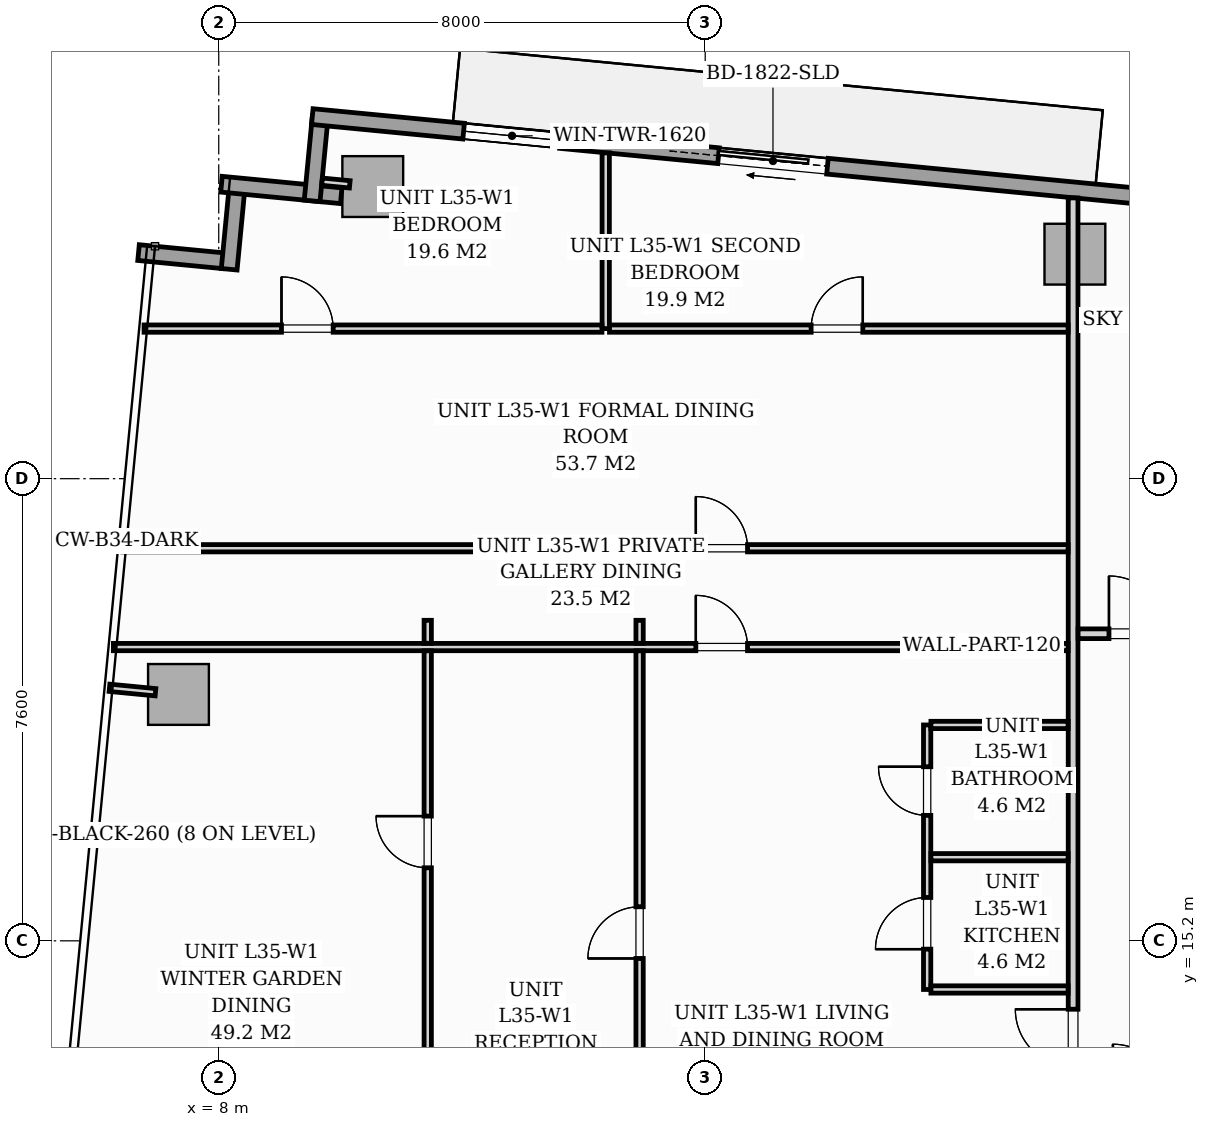
"""IFC4 building model, lengths in metres.
Left out: names, types, materials, properties, quantities, classifications, styles, units other than length and angle.
Written with IfcOpenShell. Run it as: python <this file> out.ifc"""

import sys

from ifc_helpers import new_model, si_unit, direction, frame, frame_2d, origin, origin_2d, place, context, subcontext, project, spatial, rectangle, extrude, source, transform, mapped, element, fill, save


model = new_model("IFC4")
c1 = context("Model", 3, precision=1e-05, world=origin(), true_north=direction((0.0, 1.0)))
c2 = subcontext(c1, "Body", "Model", "MODEL_VIEW")
j1 = project(units=[si_unit("LENGTHUNIT", "METRE"), si_unit("PLANEANGLEUNIT", "RADIAN")], contexts=[c1])
p1 = place(None, origin())
s1 = spatial("IfcSite", under=j1, at=p1, CompositionType="ELEMENT")
p2 = place(p1, origin())
s2 = spatial("IfcBuilding", under=s1, at=p2, CompositionType="ELEMENT")
p3 = place(p2, frame((0.0, 0.0, 124.6)))
s3 = spatial("IfcBuildingStorey", under=s2, at=p3, CompositionType="ELEMENT", Elevation=124.6)
m1 = source(origin(), c2, "Body", "SweptSolid", [
    extrude(rectangle(XDim=1.0, YDim=1.0, at=origin_2d()), origin(), (0.0, 0.0, 1.0), 3.194),
])
for number, where, z_axis, x_axis in (
    (1, (10.533, 27.604, 0.004), (0.0, 0.0, 1.0), (0.995, -0.096, 0.0)),
    (2, (22.08, 26.492, 0.004), (0.0, 0.0, 1.0), (0.995, -0.096, 0.0)),
    (3, (7.338, 19.252, 0.004), (0.0, 0.0, 1.0), (0.995, -0.096, 0.0)),
):
    element("IfcColumn", number, at=place(p3, frame(where, z_axis=z_axis, x_axis=x_axis)), inside=s3, PredefinedType="COLUMN", context=c2, shape_type="MappedRepresentation", body=[
        mapped(m1, transform((0.0, 0.0, 0.0), scale=1.0)),
    ])
p4 = place(p3, frame((6.681, 26.518, 0.0), z_axis=(0.0, 0.0, 1.0), x_axis=(0.995389446633, -0.095915846097, 0.0)))
e4 = element("IfcWall", 4, at=p4, inside=s3, PredefinedType="STANDARD", context=c2, shape_type="SweptSolid", body=[
    extrude(rectangle(XDim=1.395, YDim=0.26, at=frame_2d((0.697, 0.0))), origin(), (0.0, 0.0, 1.0), 2.94),
])
p5 = place(p3, frame((8.172, 26.244, 0.0), z_axis=(0.0, 0.0, 1.0), x_axis=(0.095725744959, 0.99540774648, 0.0)))
e5 = element("IfcWall", 5, at=p5, inside=s3, PredefinedType="STANDARD", context=c2, shape_type="SweptSolid", body=[
    extrude(rectangle(XDim=1.395, YDim=0.26, at=frame_2d((0.698, 0.0))), origin(), (0.0, 0.0, 1.0), 2.94),
])
p6 = place(p3, frame((8.045, 27.643, 0.0), z_axis=(0.0, 0.0, 1.0), x_axis=(0.995391147587, -0.095898192396, 0.0)))
e6 = element("IfcWall", 6, at=p6, inside=s3, PredefinedType="STANDARD", context=c2, shape_type="SweptSolid", body=[
    extrude(rectangle(XDim=1.978, YDim=0.26, at=frame_2d((0.989, 0.0))), origin(), (0.0, 0.0, 1.0), 2.94),
])
p7 = place(p3, frame((9.536, 27.368, 0.0), z_axis=(0.0, 0.0, 1.0), x_axis=(0.095915846097, 0.995389446633, 0.0)))
e7 = element("IfcWall", 7, at=p7, inside=s3, PredefinedType="STANDARD", context=c2, shape_type="SweptSolid", body=[
    extrude(rectangle(XDim=1.395, YDim=0.26, at=frame_2d((0.697, 0.0))), origin(), (0.0, 0.0, 1.0), 2.94),
])
p8 = place(p3, frame((9.539, 28.754, 0.0), z_axis=(0.0, 0.0, 1.0), x_axis=(0.995397345886, -0.09583383433, 0.0)))
e8 = element("IfcWall", 8, at=p8, inside=s3, PredefinedType="STANDARD", context=c2, shape_type="SweptSolid", body=[
    extrude(rectangle(XDim=17.01, YDim=0.26, at=frame_2d((8.505, 0.0))), origin(), (0.0, 0.0, 1.0), 2.94),
])
p9 = place(p8, frame((6.711, 0.0, 0.0)))
e9 = element("IfcOpeningElement", 9, at=p9, cuts=e8, PredefinedType="OPENING", context=c2, shape_type="SweptSolid", body=[
    extrude(rectangle(XDim=1.8, YDim=2.06, at=frame_2d((0.9, 1.03))), frame((0.0, 0.14, 0.0), z_axis=(0.0, -1.0, 0.0), x_axis=(1.0, 0.0, 0.0)), (0.0, 0.0, 1.0), 0.28),
])
p10 = place(p8, frame((2.5, 0.0, 0.65)))
e10 = element("IfcOpeningElement", 10, at=p10, cuts=e8, PredefinedType="OPENING", context=c2, shape_type="SweptSolid", body=[
    extrude(rectangle(XDim=1.6, YDim=1.5, at=frame_2d((0.8, 0.75))), frame((0.0, 0.14, 0.0), z_axis=(0.0, -1.0, 0.0), x_axis=(1.0, 0.0, 0.0)), (0.0, 0.0, 1.0), 0.28),
])
p11 = place(p3, frame((22.05, 12.632, 0.0), z_axis=(0.0, 0.0, 1.0), x_axis=(0.0, 1.0, 0.0)))
e11 = element("IfcWall", 11, at=p11, inside=s3, PredefinedType="PARTITIONING", context=c2, shape_type="SweptSolid", body=[
    extrude(rectangle(XDim=14.785, YDim=0.16, at=frame_2d((7.393, 0.0))), origin(), (0.0, 0.0, 1.0), 2.94),
])
p12 = place(p11, frame((0.493, 0.0, 0.0)))
e12 = element("IfcOpeningElement", 12, at=p12, cuts=e11, PredefinedType="OPENING", context=c2, shape_type="SweptSolid", body=[
    extrude(rectangle(XDim=0.95, YDim=2.06, at=frame_2d((0.475, 1.03))), frame((0.0, 0.09, 0.0), z_axis=(0.0, -1.0, 0.0), x_axis=(1.0, 0.0, 0.0)), (0.0, 0.0, 1.0), 0.18),
])
p13 = place(p3, frame((19.65, 14.4, 0.0), z_axis=(0.0, 0.0, 1.0), x_axis=(0.0, 1.0, 0.0)))
e13 = element("IfcWall", 13, at=p13, inside=s3, PredefinedType="PARTITIONING", context=c2, shape_type="SweptSolid", body=[
    extrude(rectangle(XDim=4.35, YDim=0.12, at=frame_2d((2.175, 0.0))), origin(), (0.0, 0.0, 1.0), 2.94),
])
p14 = place(p13, frame((0.663, 0.0, 0.0)))
e14 = element("IfcOpeningElement", 14, at=p14, cuts=e13, PredefinedType="OPENING", context=c2, shape_type="SweptSolid", body=[
    extrude(rectangle(XDim=0.85, YDim=2.05, at=frame_2d((0.425, 1.025))), frame((0.0, 0.07, 0.0), z_axis=(0.0, -1.0, 0.0), x_axis=(1.0, 0.0, 0.0)), (0.0, 0.0, 1.0), 0.14),
])
p15 = place(p13, frame((2.863, 0.0, 0.0)))
e15 = element("IfcOpeningElement", 15, at=p15, cuts=e13, PredefinedType="OPENING", context=c2, shape_type="SweptSolid", body=[
    extrude(rectangle(XDim=0.8, YDim=2.02, at=frame_2d((0.4, 1.01))), frame((0.0, 0.07, 0.0), z_axis=(0.0, -1.0, 0.0), x_axis=(1.0, 0.0, 0.0)), (0.0, 0.0, 1.0), 0.14),
])
for number, where, z_axis, x_axis in (
    (16, (19.712, 16.575, 0.0), (0.0, 0.0, 1.0), (1.0, 0.0, 0.0)),
    (17, (19.712, 14.4, 0.0), (0.0, 0.0, 1.0), (1.0, 0.0, 0.0)),
    (18, (19.712, 18.75, 0.0), (0.0, 0.0, 1.0), (1.0, 0.0, 0.0)),
):
    element("IfcWall", number, at=place(p3, frame(where, z_axis=z_axis, x_axis=x_axis)), inside=s3, PredefinedType="PARTITIONING", context=c2, shape_type="SweptSolid", body=[
        extrude(rectangle(XDim=2.256, YDim=0.12, at=frame_2d((1.128, 0.0))), origin(), (0.0, 0.0, 1.0), 2.94),
    ])
p16 = place(p3, frame((14.364, 25.268, 0.0), z_axis=(0.0, 0.0, 1.0), x_axis=(0.0, 1.0, 0.0)))
e19 = element("IfcWall", 19, at=p16, inside=s3, PredefinedType="PARTITIONING", context=c2, shape_type="SweptSolid", body=[
    extrude(rectangle(XDim=2.889, YDim=0.12, at=frame_2d((1.445, 0.0))), origin(), (0.0, 0.0, 1.0), 2.94),
])
p17 = place(p3, frame((6.772, 25.268, 0.0), z_axis=(0.0, 0.0, 1.0), x_axis=(1.0, 0.0, 0.0)))
e20 = element("IfcWall", 20, at=p17, inside=s3, PredefinedType="PARTITIONING", context=c2, shape_type="SweptSolid", body=[
    extrude(rectangle(XDim=7.53, YDim=0.12, at=frame_2d((3.765, 0.0))), origin(), (0.0, 0.0, 1.0), 2.94),
])
p18 = place(p17, frame((2.26, 0.0, 0.0)))
e21 = element("IfcOpeningElement", 21, at=p18, cuts=e20, PredefinedType="OPENING", context=c2, shape_type="SweptSolid", body=[
    extrude(rectangle(XDim=0.85, YDim=2.05, at=frame_2d((0.425, 1.025))), frame((0.0, 0.07, 0.0), z_axis=(0.0, -1.0, 0.0), x_axis=(1.0, 0.0, 0.0)), (0.0, 0.0, 1.0), 0.14),
])
p19 = place(p3, frame((14.426, 25.268, 0.0), z_axis=(0.0, 0.0, 1.0), x_axis=(1.0, 0.0, 0.0)))
e22 = element("IfcWall", 22, at=p19, inside=s3, PredefinedType="PARTITIONING", context=c2, shape_type="SweptSolid", body=[
    extrude(rectangle(XDim=7.542, YDim=0.12, at=frame_2d((3.771, 0.0))), origin(), (0.0, 0.0, 1.0), 2.94),
])
p20 = place(p19, frame((3.316, 0.0, 0.0)))
e23 = element("IfcOpeningElement", 23, at=p20, cuts=e22, PredefinedType="OPENING", context=c2, shape_type="SweptSolid", body=[
    extrude(rectangle(XDim=0.85, YDim=2.05, at=frame_2d((0.425, 1.025))), frame((0.0, 0.07, 0.0), z_axis=(0.0, -1.0, 0.0), x_axis=(1.0, 0.0, 0.0)), (0.0, 0.0, 1.0), 0.14),
])
p21 = place(p3, frame((6.424, 21.656, 0.0), z_axis=(0.0, 0.0, 1.0), x_axis=(1.0, 0.0, 0.0)))
e24 = element("IfcWall", 24, at=p21, inside=s3, PredefinedType="PARTITIONING", context=c2, shape_type="SweptSolid", body=[
    extrude(rectangle(XDim=15.544, YDim=0.12, at=frame_2d((7.772, 0.0))), origin(), (0.0, 0.0, 1.0), 2.94),
])
p22 = place(p21, frame((9.422, 0.0, 0.0)))
e25 = element("IfcOpeningElement", 25, at=p22, cuts=e24, PredefinedType="OPENING", context=c2, shape_type="SweptSolid", body=[
    extrude(rectangle(XDim=0.85, YDim=2.05, at=frame_2d((0.425, 1.025))), frame((0.0, 0.07, 0.0), z_axis=(0.0, -1.0, 0.0), x_axis=(1.0, 0.0, 0.0)), (0.0, 0.0, 1.0), 0.14),
])
p23 = place(p3, frame((6.268, 20.031, 0.0), z_axis=(0.0, 0.0, 1.0), x_axis=(1.0, 0.0, 0.0)))
e26 = element("IfcWall", 26, at=p23, inside=s3, PredefinedType="PARTITIONING", context=c2, shape_type="SweptSolid", body=[
    extrude(rectangle(XDim=15.7, YDim=0.12, at=frame_2d((7.85, 0.0))), origin(), (0.0, 0.0, 1.0), 2.94),
])
p24 = place(p23, frame((9.579, 0.0, 0.0)))
e27 = element("IfcOpeningElement", 27, at=p24, cuts=e26, PredefinedType="OPENING", context=c2, shape_type="SweptSolid", body=[
    extrude(rectangle(XDim=0.85, YDim=2.05, at=frame_2d((0.425, 1.025))), frame((0.0, 0.07, 0.0), z_axis=(0.0, -1.0, 0.0), x_axis=(1.0, 0.0, 0.0)), (0.0, 0.0, 1.0), 0.14),
])
p25 = place(p3, frame((11.437, 10.701, 0.0), z_axis=(0.0, 0.0, 1.0), x_axis=(0.0, 1.0, 0.0)))
e28 = element("IfcWall", 28, at=p25, inside=s3, PredefinedType="PARTITIONING", context=c2, shape_type="SweptSolid", body=[
    extrude(rectangle(XDim=9.268, YDim=0.12, at=frame_2d((4.634, 0.0))), origin(), (0.0, 0.0, 1.0), 2.94),
])
p26 = place(p25, frame((5.7, 0.0, 0.0)))
e29 = element("IfcOpeningElement", 29, at=p26, cuts=e28, PredefinedType="OPENING", context=c2, shape_type="SweptSolid", body=[
    extrude(rectangle(XDim=0.85, YDim=2.05, at=frame_2d((0.425, 1.025))), frame((0.0, 0.07, 0.0), z_axis=(0.0, -1.0, 0.0), x_axis=(1.0, 0.0, 0.0)), (0.0, 0.0, 1.0), 0.14),
])
p27 = place(p3, frame((11.437, 20.093, 0.0), z_axis=(0.0, 0.0, 1.0), x_axis=(0.0, 1.0, 0.0)))
e30 = element("IfcWall", 30, at=p27, inside=s3, PredefinedType="PARTITIONING", context=c2, shape_type="SweptSolid", body=[
    extrude(rectangle(XDim=0.378, YDim=0.12, at=frame_2d((0.189, 0.0))), origin(), (0.0, 0.0, 1.0), 2.94),
])
p28 = place(p3, frame((14.921, 10.701, 0.0), z_axis=(0.0, 0.0, 1.0), x_axis=(0.0, 1.0, 0.0)))
e31 = element("IfcWall", 31, at=p28, inside=s3, PredefinedType="PARTITIONING", context=c2, shape_type="SweptSolid", body=[
    extrude(rectangle(XDim=9.268, YDim=0.12, at=frame_2d((4.634, 0.0))), origin(), (0.0, 0.0, 1.0), 2.94),
])
p29 = place(p28, frame((4.209, 0.0, 0.0)))
e32 = element("IfcOpeningElement", 32, at=p29, cuts=e31, PredefinedType="OPENING", context=c2, shape_type="SweptSolid", body=[
    extrude(rectangle(XDim=0.85, YDim=2.05, at=frame_2d((0.425, 1.025))), frame((0.0, 0.07, 0.0), z_axis=(0.0, -1.0, 0.0), x_axis=(1.0, 0.0, 0.0)), (0.0, 0.0, 1.0), 0.14),
])
p30 = place(p3, frame((14.921, 20.093, 0.0), z_axis=(0.0, 0.0, 1.0), x_axis=(0.0, 1.0, 0.0)))
e33 = element("IfcWall", 33, at=p30, inside=s3, PredefinedType="PARTITIONING", context=c2, shape_type="SweptSolid", body=[
    extrude(rectangle(XDim=0.378, YDim=0.12, at=frame_2d((0.189, 0.0))), origin(), (0.0, 0.0, 1.0), 2.94),
])
p31 = place(p3, frame((22.132, 20.25, 0.0), z_axis=(0.0, 0.0, 1.0), x_axis=(1.0, 0.0, 0.0)))
e34 = element("IfcWall", 34, at=p31, inside=s3, PredefinedType="PARTITIONING", context=c2, shape_type="SweptSolid", body=[
    extrude(rectangle(XDim=1.886, YDim=0.16, at=frame_2d((0.943, 0.0))), origin(), (0.0, 0.0, 1.0), 2.94),
])
p32 = place(p31, frame((0.508, 0.0, 0.0)))
e35 = element("IfcOpeningElement", 35, at=p32, cuts=e34, PredefinedType="OPENING", context=c2, shape_type="SweptSolid", body=[
    extrude(rectangle(XDim=0.95, YDim=2.06, at=frame_2d((0.475, 1.03))), frame((0.0, 0.09, 0.0), z_axis=(0.0, -1.0, 0.0), x_axis=(1.0, 0.0, 0.0)), (0.0, 0.0, 1.0), 0.18),
])
p33 = place(p3, frame((10.155, 27.64, 0.0), z_axis=(0.0, 0.0, 1.0), x_axis=(-0.995435366701, 0.095438098896, 0.0)))
e36 = element("IfcWall", 36, at=p33, inside=s3, PredefinedType="PARTITIONING", context=c2, shape_type="SweptSolid", body=[
    extrude(rectangle(XDim=0.458, YDim=0.12, at=frame_2d((0.229, 0.0))), origin(), (0.0, 0.0, 1.0), 2.94),
])
p34 = place(p3, frame((6.959, 19.288, 0.0), z_axis=(0.0, 0.0, 1.0), x_axis=(-0.995377786728, 0.096036772582, 0.0)))
e37 = element("IfcWall", 37, at=p34, inside=s3, PredefinedType="PARTITIONING", context=c2, shape_type="SweptSolid", body=[
    extrude(rectangle(XDim=0.76, YDim=0.12, at=frame_2d((0.38, 0.0))), origin(), (0.0, 0.0, 1.0), 2.94),
])
m2 = source(origin(), c2, "Body", "SweptSolid", [
    extrude(rectangle(XDim=1.8, YDim=2.06, at=frame_2d((0.9, 1.03))), frame((0.0, 0.025, 0.0), z_axis=(0.0, -1.0, 0.0), x_axis=(1.0, 0.0, 0.0)), (0.0, 0.0, 1.0), 0.05),
])
p35 = place(p9, origin())
e38 = element("IfcDoor", 38, at=p35, inside=s3, OperationType="SLIDING_TO_LEFT", PredefinedType="DOOR", context=c2, shape_type="MappedRepresentation", body=[
    mapped(m2, transform((0.0, 0.0, 0.0), scale=1.0)),
])
fill(e9, e38)
m3 = source(origin(), c2, "Body", "SweptSolid", [
    extrude(rectangle(XDim=1.6, YDim=1.5, at=frame_2d((0.8, 0.75))), frame((0.0, 0.03, 0.0), z_axis=(0.0, -1.0, 0.0), x_axis=(1.0, 0.0, 0.0)), (0.0, 0.0, 1.0), 0.06),
])
p36 = place(p10, origin())
e39 = element("IfcWindow", 39, at=p36, inside=s3, PartitioningType="SINGLE_PANEL", PredefinedType="WINDOW", context=c2, shape_type="MappedRepresentation", body=[
    mapped(m3, transform((0.0, 0.0, 0.0), scale=1.0)),
])
fill(e10, e39)
m4 = source(origin(), c2, "Body", "SweptSolid", [
    extrude(rectangle(XDim=0.95, YDim=2.06, at=frame_2d((0.475, 1.03))), frame((0.0, 0.025, 0.0), z_axis=(0.0, -1.0, 0.0), x_axis=(1.0, 0.0, 0.0)), (0.0, 0.0, 1.0), 0.05),
])
p37 = place(p12, origin())
e40 = element("IfcDoor", 40, at=p37, inside=s3, OperationType="SINGLE_SWING_RIGHT", PredefinedType="DOOR", context=c2, shape_type="MappedRepresentation", body=[
    mapped(m4, transform((0.0, 0.0, 0.0), scale=1.0)),
])
fill(e12, e40)
m5 = source(origin(), c2, "Body", "SweptSolid", [
    extrude(rectangle(XDim=0.85, YDim=2.05, at=frame_2d((0.425, 1.025))), frame((0.0, 0.025, 0.0), z_axis=(0.0, -1.0, 0.0), x_axis=(1.0, 0.0, 0.0)), (0.0, 0.0, 1.0), 0.05),
])
p38 = place(p14, origin())
e41 = element("IfcDoor", 41, at=p38, inside=s3, OperationType="SINGLE_SWING_LEFT", PredefinedType="DOOR", context=c2, shape_type="MappedRepresentation", body=[
    mapped(m5, transform((0.0, 0.0, 0.0), scale=1.0)),
])
fill(e14, e41)
m6 = source(origin(), c2, "Body", "SweptSolid", [
    extrude(rectangle(XDim=0.8, YDim=2.02, at=frame_2d((0.4, 1.01))), frame((0.0, 0.025, 0.0), z_axis=(0.0, -1.0, 0.0), x_axis=(1.0, 0.0, 0.0)), (0.0, 0.0, 1.0), 0.05),
])
p39 = place(p15, origin())
e42 = element("IfcDoor", 42, at=p39, inside=s3, OperationType="SINGLE_SWING_RIGHT", PredefinedType="DOOR", context=c2, shape_type="MappedRepresentation", body=[
    mapped(m6, transform((0.0, 0.0, 0.0), scale=1.0)),
])
fill(e15, e42)
p40 = place(p18, origin())
e43 = element("IfcDoor", 43, at=p40, inside=s3, OperationType="SINGLE_SWING_LEFT", PredefinedType="DOOR", context=c2, shape_type="MappedRepresentation", body=[
    mapped(m5, transform((0.0, 0.0, 0.0), scale=1.0)),
])
fill(e21, e43)
p41 = place(p20, origin())
e44 = element("IfcDoor", 44, at=p41, inside=s3, OperationType="SINGLE_SWING_RIGHT", PredefinedType="DOOR", context=c2, shape_type="MappedRepresentation", body=[
    mapped(m5, transform((0.0, 0.0, 0.0), scale=1.0)),
])
fill(e23, e44)
p42 = place(p22, origin())
e45 = element("IfcDoor", 45, at=p42, inside=s3, OperationType="SINGLE_SWING_LEFT", PredefinedType="DOOR", context=c2, shape_type="MappedRepresentation", body=[
    mapped(m5, transform((0.0, 0.0, 0.0), scale=1.0)),
])
fill(e25, e45)
p43 = place(p24, origin())
e46 = element("IfcDoor", 46, at=p43, inside=s3, OperationType="SINGLE_SWING_LEFT", PredefinedType="DOOR", context=c2, shape_type="MappedRepresentation", body=[
    mapped(m5, transform((0.0, 0.0, 0.0), scale=1.0)),
])
fill(e27, e46)
p44 = place(p26, origin())
e47 = element("IfcDoor", 47, at=p44, inside=s3, OperationType="SINGLE_SWING_RIGHT", PredefinedType="DOOR", context=c2, shape_type="MappedRepresentation", body=[
    mapped(m5, transform((0.0, 0.0, 0.0), scale=1.0)),
])
fill(e29, e47)
p45 = place(p29, origin())
e48 = element("IfcDoor", 48, at=p45, inside=s3, OperationType="SINGLE_SWING_LEFT", PredefinedType="DOOR", context=c2, shape_type="MappedRepresentation", body=[
    mapped(m5, transform((0.0, 0.0, 0.0), scale=1.0)),
])
fill(e32, e48)
p46 = place(p32, origin())
e49 = element("IfcDoor", 49, at=p46, inside=s3, OperationType="SINGLE_SWING_LEFT", PredefinedType="DOOR", context=c2, shape_type="MappedRepresentation", body=[
    mapped(m4, transform((0.0, 0.0, 0.0), scale=1.0)),
])
fill(e35, e49)
save(model, sys.argv[1])
